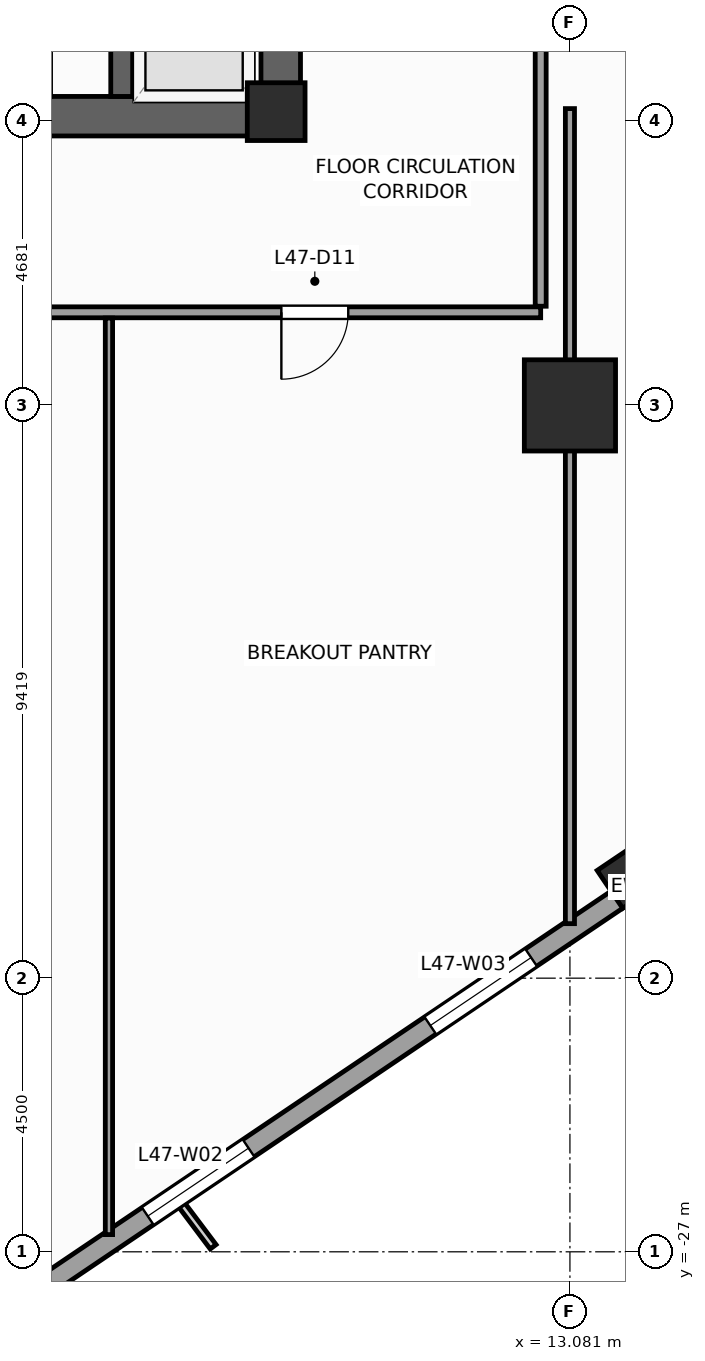
"""IFC4 building model, lengths in metres.
Left out: names, types, materials, properties, quantities, classifications, styles, units other than length and angle.
Written with IfcOpenShell. Run it as: python <this file> out.ifc"""

import sys

from ifc_helpers import new_model, si_unit, direction, frame, frame_2d, origin, origin_2d, place, context, subcontext, project, spatial, rectangle, extrude, source, transform, mapped, element, fill, save


model = new_model("IFC4")
c1 = context("Model", 3, precision=1e-05, world=origin(), true_north=direction((0.0, 1.0)))
c2 = subcontext(c1, "Body", "Model", "MODEL_VIEW")
j1 = project(units=[si_unit("LENGTHUNIT", "METRE"), si_unit("PLANEANGLEUNIT", "RADIAN")], contexts=[c1])
p1 = place(None, origin())
s1 = spatial("IfcSite", under=j1, at=p1, CompositionType="ELEMENT")
p2 = place(p1, origin())
s2 = spatial("IfcBuilding", under=s1, at=p2, CompositionType="ELEMENT")
p3 = place(p2, frame((0.0, 0.0, 196.4)))
s3 = spatial("IfcBuildingStorey", under=s2, at=p3, CompositionType="ELEMENT", Elevation=196.4)
p4 = place(p3, frame((-8.65, -8.325, 0.0), z_axis=(0.0, 0.0, 1.0), x_axis=(1.0, 0.0, 0.0)))
e1 = element("IfcWall", 1, at=p4, inside=s3, PredefinedType="SHEAR", context=c2, shape_type="SweptSolid", body=[
    extrude(rectangle(XDim=17.3, YDim=0.65, at=frame_2d((8.65, 0.0))), origin(), (0.0, 0.0, 1.0), 4.0),
])
p5 = place(p4, frame((8.0, 0.0, 0.0)))
e2 = element("IfcOpeningElement", 2, at=p5, cuts=e1, PredefinedType="OPENING", context=c2, shape_type="SweptSolid", body=[
    extrude(rectangle(XDim=1.3, YDim=2.2, at=frame_2d((0.65, 1.1))), frame((0.0, 0.335, 0.0), z_axis=(0.0, -1.0, 0.0), x_axis=(1.0, 0.0, 0.0)), (0.0, 0.0, 1.0), 0.67),
])
p6 = place(p3, frame((8.325, -8.0, 0.0), z_axis=(0.0, 0.0, 1.0), x_axis=(0.0, 1.0, 0.0)))
e3 = element("IfcWall", 3, at=p6, inside=s3, PredefinedType="SHEAR", context=c2, shape_type="SweptSolid", body=[
    extrude(rectangle(XDim=16.0, YDim=0.65, at=frame_2d((8.0, 0.0))), origin(), (0.0, 0.0, 1.0), 4.0),
])
p7 = place(p6, frame((4.69, 0.0, 0.0)))
e4 = element("IfcOpeningElement", 4, at=p7, cuts=e3, PredefinedType="OPENING", context=c2, shape_type="SweptSolid", body=[
    extrude(rectangle(XDim=1.3, YDim=2.2, at=frame_2d((0.65, 1.1))), frame((0.0, 0.335, 0.0), z_axis=(0.0, -1.0, 0.0), x_axis=(1.0, 0.0, 0.0)), (0.0, 0.0, 1.0), 0.67),
])
p8 = place(p3, frame((5.71, -8.0, 0.0), z_axis=(0.0, 0.0, 1.0), x_axis=(0.0, 1.0, 0.0)))
e5 = element("IfcWall", 5, at=p8, inside=s3, PredefinedType="SHEAR", context=c2, shape_type="SweptSolid", body=[
    extrude(rectangle(XDim=2.54, YDim=0.36, at=frame_2d((1.27, 0.0))), origin(), (0.0, 0.0, 1.0), 4.0),
])
m1 = source(origin(), c2, "Body", "SweptSolid", [
    extrude(rectangle(XDim=0.95, YDim=0.95, at=origin_2d()), origin(), (0.0, 0.0, 1.0), 4.0),
])
p9 = place(p3, frame((8.25, -8.25, 0.0), z_axis=(0.0, 0.0, 1.0), x_axis=(1.0, 0.0, 0.0)))
e6 = element("IfcColumn", 6, at=p9, inside=s3, PredefinedType="PILASTER", context=c2, shape_type="MappedRepresentation", body=[
    mapped(m1, transform((0.0, 0.0, 0.0), scale=1.0)),
])
m2 = source(origin(), c2, "Body", "SweptSolid", [
    extrude(rectangle(XDim=1.5, YDim=1.5, at=origin_2d()), origin(), (0.0, 0.0, 1.0), 4.0),
])
p10 = place(p3, frame((13.081, -13.081, 0.0), z_axis=(0.0, 0.0, 1.0), x_axis=(1.0, 0.0, 0.0)))
e7 = element("IfcColumn", 7, at=p10, inside=s3, PredefinedType="COLUMN", context=c2, shape_type="MappedRepresentation", body=[
    mapped(m2, transform((0.0, 0.0, 0.0), scale=1.0)),
])
m3 = source(origin(), c2, "Body", "SweptSolid", [
    extrude(rectangle(XDim=0.75, YDim=0.75, at=origin_2d()), origin(), (0.0, 0.0, 1.0), 4.0),
])
p11 = place(p3, frame((14.05, -20.83, 0.0), z_axis=(0.0, 0.0, 1.0), x_axis=(0.829037572555, 0.559192903471, 0.0)))
e8 = element("IfcColumn", 8, at=p11, inside=s3, PredefinedType="COLUMN", context=c2, shape_type="MappedRepresentation", body=[
    mapped(m3, transform((0.0, 0.0, 0.0), scale=1.0)),
])
p12 = place(p3, frame((-2.972, -32.558, 0.0), z_axis=(0.0, 0.0, 1.0), x_axis=(0.829036218961, 0.559194910251, 0.0)))
e9 = element("IfcWall", 9, at=p12, inside=s3, PredefinedType="STANDARD", context=c2, shape_type="SweptSolid", body=[
    extrude(rectangle(XDim=41.34, YDim=0.34, at=frame_2d((20.67, 0.0))), origin(), (0.0, 0.0, 1.0), 2.2),
])
p13 = place(p12, frame((25.745, 0.0, 0.0)))
e10 = element("IfcOpeningElement", 10, at=p13, cuts=e9, PredefinedType="OPENING", context=c2, shape_type="SweptSolid", body=[
    extrude(rectangle(XDim=1.05, YDim=2.02, at=frame_2d((0.525, 1.01))), frame((0.0, 0.18, 0.0), z_axis=(0.0, -1.0, 0.0), x_axis=(1.0, 0.0, 0.0)), (0.0, 0.0, 1.0), 0.36),
])
p14 = place(p12, frame((4.711, 0.0, 0.67)))
e11 = element("IfcOpeningElement", 11, at=p14, cuts=e9, PredefinedType="OPENING", context=c2, shape_type="SweptSolid", body=[
    extrude(rectangle(XDim=2.0, YDim=1.45, at=frame_2d((1.0, 0.725))), frame((0.0, 0.18, 0.0), z_axis=(0.0, -1.0, 0.0), x_axis=(1.0, 0.0, 0.0)), (0.0, 0.0, 1.0), 0.36),
])
p15 = place(p12, frame((10.989, 0.0, 0.67)))
e12 = element("IfcOpeningElement", 12, at=p15, cuts=e9, PredefinedType="OPENING", context=c2, shape_type="SweptSolid", body=[
    extrude(rectangle(XDim=2.0, YDim=1.45, at=frame_2d((1.0, 0.725))), frame((0.0, 0.18, 0.0), z_axis=(0.0, -1.0, 0.0), x_axis=(1.0, 0.0, 0.0)), (0.0, 0.0, 1.0), 0.36),
])
p16 = place(p12, frame((16.593, 0.0, 0.67)))
e13 = element("IfcOpeningElement", 13, at=p16, cuts=e9, PredefinedType="OPENING", context=c2, shape_type="SweptSolid", body=[
    extrude(rectangle(XDim=2.0, YDim=1.45, at=frame_2d((1.0, 0.725))), frame((0.0, 0.18, 0.0), z_axis=(0.0, -1.0, 0.0), x_axis=(1.0, 0.0, 0.0)), (0.0, 0.0, 1.0), 0.36),
])
p17 = place(p12, frame((27.861, 0.0, 0.67)))
e14 = element("IfcOpeningElement", 14, at=p17, cuts=e9, PredefinedType="OPENING", context=c2, shape_type="SweptSolid", body=[
    extrude(rectangle(XDim=2.0, YDim=1.45, at=frame_2d((1.0, 0.725))), frame((0.0, 0.18, 0.0), z_axis=(0.0, -1.0, 0.0), x_axis=(1.0, 0.0, 0.0)), (0.0, 0.0, 1.0), 0.36),
])
p18 = place(p12, frame((34.552, 0.0, 0.67)))
e15 = element("IfcOpeningElement", 15, at=p18, cuts=e9, PredefinedType="OPENING", context=c2, shape_type="SweptSolid", body=[
    extrude(rectangle(XDim=2.0, YDim=1.45, at=frame_2d((1.0, 0.725))), frame((0.0, 0.18, 0.0), z_axis=(0.0, -1.0, 0.0), x_axis=(1.0, 0.0, 0.0)), (0.0, 0.0, 1.0), 0.36),
])
p19 = place(p3, frame((-12.6, -11.55, 0.0), z_axis=(0.0, 0.0, 1.0), x_axis=(1.0, 0.0, 0.0)))
e16 = element("IfcWall", 16, at=p19, inside=s3, PredefinedType="PARTITIONING", context=c2, shape_type="SweptSolid", body=[
    extrude(rectangle(XDim=25.2, YDim=0.18, at=frame_2d((12.6, 0.0))), origin(), (0.0, 0.0, 1.0), 3.6),
])
p20 = place(p19, frame((3.165, 0.0, 0.0)))
e17 = element("IfcOpeningElement", 17, at=p20, cuts=e16, PredefinedType="OPENING", context=c2, shape_type="SweptSolid", body=[
    extrude(rectangle(XDim=1.1, YDim=2.2, at=frame_2d((0.55, 1.1))), frame((0.0, 0.1, 0.0), z_axis=(0.0, -1.0, 0.0), x_axis=(1.0, 0.0, 0.0)), (0.0, 0.0, 1.0), 0.2),
])
p21 = place(p19, frame((9.3, 0.0, 0.0)))
e18 = element("IfcOpeningElement", 18, at=p21, cuts=e16, PredefinedType="OPENING", context=c2, shape_type="SweptSolid", body=[
    extrude(rectangle(XDim=1.1, YDim=2.2, at=frame_2d((0.55, 1.1))), frame((0.0, 0.1, 0.0), z_axis=(0.0, -1.0, 0.0), x_axis=(1.0, 0.0, 0.0)), (0.0, 0.0, 1.0), 0.2),
])
p22 = place(p19, frame((14.8, 0.0, 0.0)))
e19 = element("IfcOpeningElement", 19, at=p22, cuts=e16, PredefinedType="OPENING", context=c2, shape_type="SweptSolid", body=[
    extrude(rectangle(XDim=1.1, YDim=2.2, at=frame_2d((0.55, 1.1))), frame((0.0, 0.1, 0.0), z_axis=(0.0, -1.0, 0.0), x_axis=(1.0, 0.0, 0.0)), (0.0, 0.0, 1.0), 0.2),
])
p23 = place(p19, frame((20.936, 0.0, 0.0)))
e20 = element("IfcOpeningElement", 20, at=p23, cuts=e16, PredefinedType="OPENING", context=c2, shape_type="SweptSolid", body=[
    extrude(rectangle(XDim=1.1, YDim=2.2, at=frame_2d((0.55, 1.1))), frame((0.0, 0.1, 0.0), z_axis=(0.0, -1.0, 0.0), x_axis=(1.0, 0.0, 0.0)), (0.0, 0.0, 1.0), 0.2),
])
p24 = place(p3, frame((12.6, -11.45, 0.0), z_axis=(0.0, 0.0, 1.0), x_axis=(0.0, 1.0, 0.0)))
e21 = element("IfcWall", 21, at=p24, inside=s3, PredefinedType="PARTITIONING", context=c2, shape_type="SweptSolid", body=[
    extrude(rectangle(XDim=15.25, YDim=0.18, at=frame_2d((7.625, 0.0))), origin(), (0.0, 0.0, 1.0), 2.56),
])
p25 = place(p24, frame((13.21, 0.0, 0.0)))
e22 = element("IfcOpeningElement", 22, at=p25, cuts=e21, PredefinedType="OPENING", context=c2, shape_type="SweptSolid", body=[
    extrude(rectangle(XDim=1.1, YDim=2.2, at=frame_2d((0.55, 1.1))), frame((0.0, 0.1, 0.0), z_axis=(0.0, -1.0, 0.0), x_axis=(1.0, 0.0, 0.0)), (0.0, 0.0, 1.0), 0.2),
])
p26 = place(p24, frame((5.5, 0.0, 0.0)))
e23 = element("IfcOpeningElement", 23, at=p26, cuts=e21, PredefinedType="OPENING", context=c2, shape_type="SweptSolid", body=[
    extrude(rectangle(XDim=1.1, YDim=2.2, at=frame_2d((0.55, 1.1))), frame((0.0, 0.1, 0.0), z_axis=(0.0, -1.0, 0.0), x_axis=(1.0, 0.0, 0.0)), (0.0, 0.0, 1.0), 0.2),
])
p27 = place(p24, frame((10.175, 0.0, 0.0)))
e24 = element("IfcOpeningElement", 24, at=p27, cuts=e21, PredefinedType="OPENING", context=c2, shape_type="SweptSolid", body=[
    extrude(rectangle(XDim=1.1, YDim=2.2, at=frame_2d((0.55, 1.1))), frame((0.0, 0.1, 0.0), z_axis=(0.0, -1.0, 0.0), x_axis=(1.0, 0.0, 0.0)), (0.0, 0.0, 1.0), 0.2),
])
p28 = place(p3, frame((5.5, -26.717, 0.0), z_axis=(0.0, 0.0, 1.0), x_axis=(0.0, 1.0, 0.0)))
e25 = element("IfcWall", 25, at=p28, inside=s3, PredefinedType="PARTITIONING", context=c2, shape_type="SweptSolid", body=[
    extrude(rectangle(XDim=15.072, YDim=0.12, at=frame_2d((7.536, 0.0))), origin(), (0.0, 0.0, 1.0), 3.6),
])
p29 = place(p3, frame((13.081, -8.2, 0.0), z_axis=(0.0, 0.0, 1.0), x_axis=(0.0, -1.0, 0.0)))
e26 = element("IfcWall", 26, at=p29, inside=s3, PredefinedType="PARTITIONING", context=c2, shape_type="SweptSolid", body=[
    extrude(rectangle(XDim=13.404, YDim=0.15, at=frame_2d((6.702, 0.0))), origin(), (0.0, 0.0, 1.0), 2.2),
])
m4 = source(origin(), c2, "Body", "SweptSolid", [
    extrude(rectangle(XDim=2.0, YDim=1.45, at=frame_2d((1.0, 0.725))), frame((0.0, 0.03, 0.0), z_axis=(0.0, -1.0, 0.0), x_axis=(1.0, 0.0, 0.0)), (0.0, 0.0, 1.0), 0.06),
])
p30 = place(p15, origin())
e27 = element("IfcWindow", 27, at=p30, inside=s3, PartitioningType="SINGLE_PANEL", PredefinedType="WINDOW", context=c2, shape_type="MappedRepresentation", body=[
    mapped(m4, transform((0.0, 0.0, 0.0), scale=1.0)),
])
fill(e12, e27)
p31 = place(p16, origin())
e28 = element("IfcWindow", 28, at=p31, inside=s3, PartitioningType="SINGLE_PANEL", PredefinedType="WINDOW", context=c2, shape_type="MappedRepresentation", body=[
    mapped(m4, transform((0.0, 0.0, 0.0), scale=1.0)),
])
fill(e13, e28)
m5 = source(origin(), c2, "Body", "SweptSolid", [
    extrude(rectangle(XDim=1.1, YDim=2.2, at=frame_2d((0.55, 1.1))), frame((0.0, 0.025, 0.0), z_axis=(0.0, -1.0, 0.0), x_axis=(1.0, 0.0, 0.0)), (0.0, 0.0, 1.0), 0.05),
])
p32 = place(p23, frame((1.1, 0.0, 0.0), z_axis=(0.0, 0.0, 1.0), x_axis=(-1.0, 0.0, 0.0)))
e29 = element("IfcDoor", 29, at=p32, inside=s3, OperationType="SINGLE_SWING_LEFT", PredefinedType="DOOR", context=c2, shape_type="MappedRepresentation", body=[
    mapped(m5, transform((0.0, 0.0, 0.0), scale=1.0)),
])
fill(e20, e29)
save(model, sys.argv[1])
